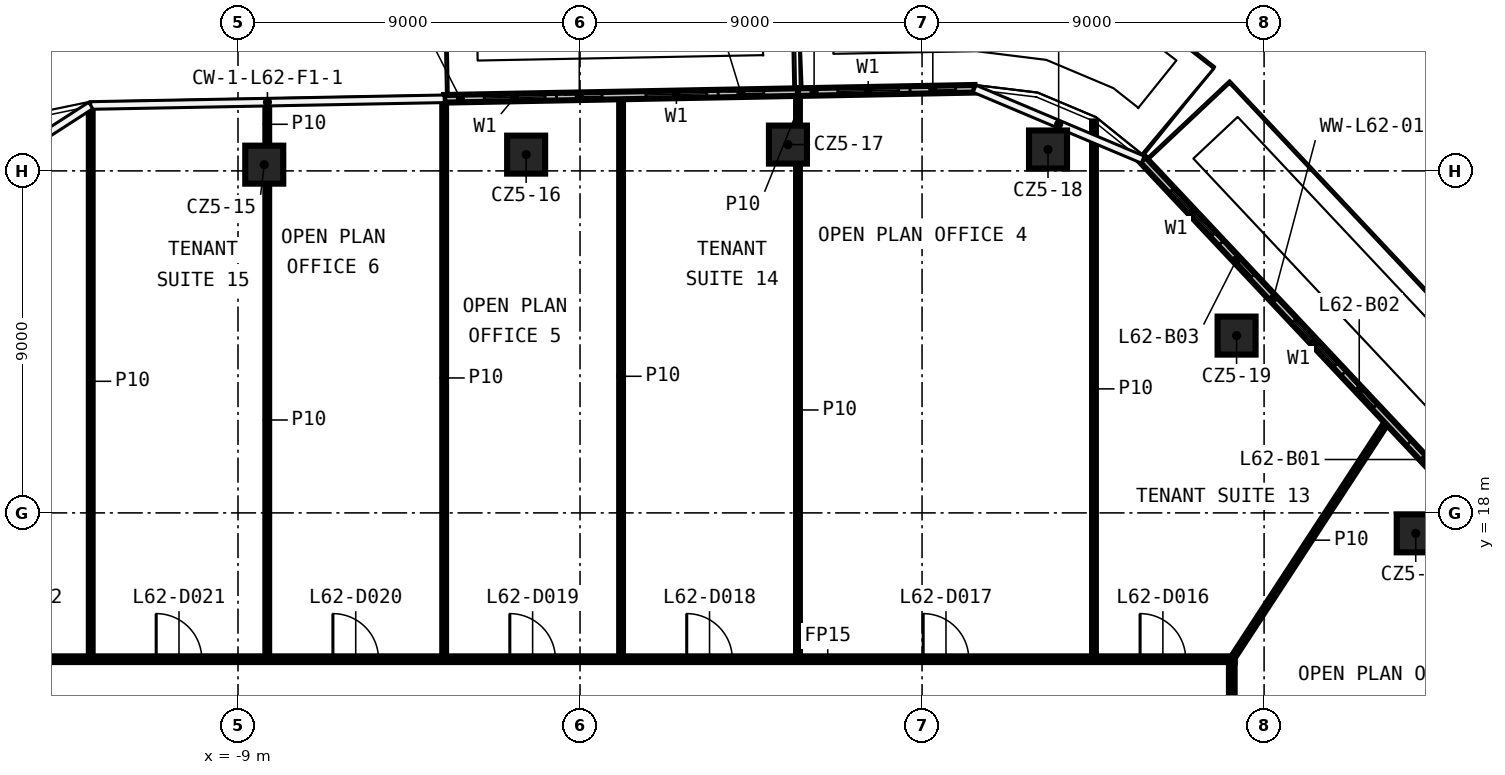
"""IFC4 building model, lengths in metres.
Left out: names, types, materials, properties, quantities, classifications, styles, units other than length and angle.
Written with IfcOpenShell. Run it as: python <this file> out.ifc"""

import sys

from ifc_helpers import new_model, si_unit, direction, frame, frame_2d, origin, origin_2d, place, context, subcontext, project, spatial, rectangle, extrude, element, fill, save


model = new_model("IFC4")
c1 = context("Model", 3, precision=1e-05, world=origin(), true_north=direction((0.0, 1.0)))
c2 = subcontext(c1, "Body", "Model", "MODEL_VIEW")
j1 = project(units=[si_unit("LENGTHUNIT", "METRE"), si_unit("PLANEANGLEUNIT", "RADIAN")], contexts=[c1])
p1 = place(None, origin())
s1 = spatial("IfcSite", under=j1, at=p1, CompositionType="ELEMENT")
p2 = place(p1, origin())
s2 = spatial("IfcBuilding", under=s1, at=p2, CompositionType="ELEMENT")
p3 = place(p2, frame((0.0, 0.0, 294.2)))
s3 = spatial("IfcBuildingStorey", under=s2, at=p3, CompositionType="ELEMENT", Elevation=294.2)
for number, where, z_axis, x_axis in (
    (1, (-8.309, 27.164, 0.0), (0.0, 0.0, 1.0), (1.0, 0.0, 0.0)),
    (2, (-1.418, 27.428, 0.0), (0.0, 0.0, 1.0), (1.0, 0.0, 0.0)),
    (3, (5.471, 27.692, 0.0), (0.0, 0.0, 1.0), (1.0, 0.0, 0.0)),
    (4, (12.314, 27.563, 0.0), (0.0, 0.0, 1.0), (1.0, 0.0, 0.0)),
    (5, (17.276, 22.666, 0.0), (0.0, 0.0, 1.0), (1.0, 0.0, 0.0)),
    (6, (21.99, 17.462, 0.0), (0.0, 0.0, 1.0), (1.0, 0.0, 0.0)),
):
    element("IfcColumn", number, at=place(p3, frame(where, z_axis=z_axis, x_axis=x_axis)), inside=s3, PredefinedType="COLUMN", context=c2, shape_type="SweptSolid", body=[
        extrude(rectangle(XDim=1.0, YDim=1.0, at=origin_2d()), origin(), (0.0, 0.0, 1.0), 3.82),
    ])
p4 = place(p3, frame((-17.225, 14.15, 0.0), z_axis=(0.0, 0.0, 1.0), x_axis=(1.0, 0.0, 0.0)))
e7 = element("IfcWall", 7, at=p4, inside=s3, PredefinedType="PARTITIONING", context=c2, shape_type="SweptSolid", body=[
    extrude(rectangle(XDim=34.45, YDim=0.15, at=frame_2d((17.225, 0.0))), origin(), (0.0, 0.0, 1.0), 3.82),
])
p5 = place(p4, frame((31.962, 0.0, 0.0)))
e8 = element("IfcOpeningElement", 8, at=p5, cuts=e7, PredefinedType="OPENING", context=c2, shape_type="SweptSolid", body=[
    extrude(rectangle(XDim=1.2, YDim=2.1, at=frame_2d((0.6, 1.05))), frame((0.0, 0.085, 0.0), z_axis=(0.0, -1.0, 0.0), x_axis=(1.0, 0.0, 0.0)), (0.0, 0.0, 1.0), 0.17),
])
p6 = place(p4, frame((26.254, 0.0, 0.0)))
e9 = element("IfcOpeningElement", 9, at=p6, cuts=e7, PredefinedType="OPENING", context=c2, shape_type="SweptSolid", body=[
    extrude(rectangle(XDim=1.2, YDim=2.1, at=frame_2d((0.6, 1.05))), frame((0.0, 0.085, 0.0), z_axis=(0.0, -1.0, 0.0), x_axis=(1.0, 0.0, 0.0)), (0.0, 0.0, 1.0), 0.17),
])
p7 = place(p4, frame((20.032, 0.0, 0.0)))
e10 = element("IfcOpeningElement", 10, at=p7, cuts=e7, PredefinedType="OPENING", context=c2, shape_type="SweptSolid", body=[
    extrude(rectangle(XDim=1.2, YDim=2.1, at=frame_2d((0.6, 1.05))), frame((0.0, 0.085, 0.0), z_axis=(0.0, -1.0, 0.0), x_axis=(1.0, 0.0, 0.0)), (0.0, 0.0, 1.0), 0.17),
])
p8 = place(p4, frame((15.378, 0.0, 0.0)))
e11 = element("IfcOpeningElement", 11, at=p8, cuts=e7, PredefinedType="OPENING", context=c2, shape_type="SweptSolid", body=[
    extrude(rectangle(XDim=1.2, YDim=2.1, at=frame_2d((0.6, 1.05))), frame((0.0, 0.085, 0.0), z_axis=(0.0, -1.0, 0.0), x_axis=(1.0, 0.0, 0.0)), (0.0, 0.0, 1.0), 0.17),
])
p9 = place(p4, frame((10.723, 0.0, 0.0)))
e12 = element("IfcOpeningElement", 12, at=p9, cuts=e7, PredefinedType="OPENING", context=c2, shape_type="SweptSolid", body=[
    extrude(rectangle(XDim=1.2, YDim=2.1, at=frame_2d((0.6, 1.05))), frame((0.0, 0.085, 0.0), z_axis=(0.0, -1.0, 0.0), x_axis=(1.0, 0.0, 0.0)), (0.0, 0.0, 1.0), 0.17),
])
p10 = place(p4, frame((6.073, 0.0, 0.0)))
e13 = element("IfcOpeningElement", 13, at=p10, cuts=e7, PredefinedType="OPENING", context=c2, shape_type="SweptSolid", body=[
    extrude(rectangle(XDim=1.2, YDim=2.1, at=frame_2d((0.6, 1.05))), frame((0.0, 0.085, 0.0), z_axis=(0.0, -1.0, 0.0), x_axis=(1.0, 0.0, 0.0)), (0.0, 0.0, 1.0), 0.17),
])
p11 = place(p4, frame((1.774, 0.0, 0.0)))
e14 = element("IfcOpeningElement", 14, at=p11, cuts=e7, PredefinedType="OPENING", context=c2, shape_type="SweptSolid", body=[
    extrude(rectangle(XDim=1.2, YDim=2.1, at=frame_2d((0.6, 1.05))), frame((0.0, 0.085, 0.0), z_axis=(0.0, -1.0, 0.0), x_axis=(1.0, 0.0, 0.0)), (0.0, 0.0, 1.0), 0.17),
])
p12 = place(p3, frame((17.15, 14.15, 0.0), z_axis=(0.0, 0.0, 1.0), x_axis=(0.547120172247, 0.837054070608, 0.0)))
e15 = element("IfcWall", 15, at=p12, inside=s3, PredefinedType="PARTITIONING", context=c2, shape_type="SweptSolid", body=[
    extrude(rectangle(XDim=7.485, YDim=0.1, at=frame_2d((3.743, 0.0))), origin(), (0.0, 0.0, 1.0), 3.82),
])
p13 = place(p3, frame((17.15, 14.075, 0.0), z_axis=(0.0, 0.0, 1.0), x_axis=(0.0, -1.0, 0.0)))
e16 = element("IfcWall", 16, at=p13, inside=s3, PredefinedType="PARTITIONING", context=c2, shape_type="SweptSolid", body=[
    extrude(rectangle(XDim=28.15, YDim=0.15, at=frame_2d((14.075, 0.0))), origin(), (0.0, 0.0, 1.0), 3.82),
])
p14 = place(p13, frame((24.326, 0.0, 0.0)))
e17 = element("IfcOpeningElement", 17, at=p14, cuts=e16, PredefinedType="OPENING", context=c2, shape_type="SweptSolid", body=[
    extrude(rectangle(XDim=1.2, YDim=2.1, at=frame_2d((0.6, 1.05))), frame((0.0, 0.085, 0.0), z_axis=(0.0, -1.0, 0.0), x_axis=(1.0, 0.0, 0.0)), (0.0, 0.0, 1.0), 0.17),
])
p15 = place(p13, frame((20.22, 0.0, 0.0)))
e18 = element("IfcOpeningElement", 18, at=p15, cuts=e16, PredefinedType="OPENING", context=c2, shape_type="SweptSolid", body=[
    extrude(rectangle(XDim=1.2, YDim=2.1, at=frame_2d((0.6, 1.05))), frame((0.0, 0.085, 0.0), z_axis=(0.0, -1.0, 0.0), x_axis=(1.0, 0.0, 0.0)), (0.0, 0.0, 1.0), 0.17),
])
p16 = place(p13, frame((16.114, 0.0, 0.0)))
e19 = element("IfcOpeningElement", 19, at=p16, cuts=e16, PredefinedType="OPENING", context=c2, shape_type="SweptSolid", body=[
    extrude(rectangle(XDim=1.2, YDim=2.1, at=frame_2d((0.6, 1.05))), frame((0.0, 0.085, 0.0), z_axis=(0.0, -1.0, 0.0), x_axis=(1.0, 0.0, 0.0)), (0.0, 0.0, 1.0), 0.17),
])
p17 = place(p13, frame((12.012, 0.0, 0.0)))
e20 = element("IfcOpeningElement", 20, at=p17, cuts=e16, PredefinedType="OPENING", context=c2, shape_type="SweptSolid", body=[
    extrude(rectangle(XDim=1.2, YDim=2.1, at=frame_2d((0.6, 1.05))), frame((0.0, 0.085, 0.0), z_axis=(0.0, -1.0, 0.0), x_axis=(1.0, 0.0, 0.0)), (0.0, 0.0, 1.0), 0.17),
])
p18 = place(p13, frame((5.504, 0.0, 0.0)))
e21 = element("IfcOpeningElement", 21, at=p18, cuts=e16, PredefinedType="OPENING", context=c2, shape_type="SweptSolid", body=[
    extrude(rectangle(XDim=1.2, YDim=2.1, at=frame_2d((0.6, 1.05))), frame((0.0, 0.085, 0.0), z_axis=(0.0, -1.0, 0.0), x_axis=(1.0, 0.0, 0.0)), (0.0, 0.0, 1.0), 0.17),
])
p19 = place(p13, frame((1.622, 0.0, 0.0)))
e22 = element("IfcOpeningElement", 22, at=p19, cuts=e16, PredefinedType="OPENING", context=c2, shape_type="SweptSolid", body=[
    extrude(rectangle(XDim=1.2, YDim=2.1, at=frame_2d((0.6, 1.05))), frame((0.0, 0.085, 0.0), z_axis=(0.0, -1.0, 0.0), x_axis=(1.0, 0.0, 0.0)), (0.0, 0.0, 1.0), 0.17),
])
p20 = place(p3, frame((13.524, 14.225, 0.0), z_axis=(0.0, 0.0, 1.0), x_axis=(0.0, 1.0, 0.0)))
e23 = element("IfcWall", 23, at=p20, inside=s3, PredefinedType="PARTITIONING", context=c2, shape_type="SweptSolid", body=[
    extrude(rectangle(XDim=14.077, YDim=0.1, at=frame_2d((7.039, 0.0))), origin(), (0.0, 0.0, 1.0), 3.82),
])
p21 = place(p3, frame((5.735, 14.225, 0.0), z_axis=(0.0, 0.0, 1.0), x_axis=(0.0, 1.0, 0.0)))
e24 = element("IfcWall", 24, at=p21, inside=s3, PredefinedType="PARTITIONING", context=c2, shape_type="SweptSolid", body=[
    extrude(rectangle(XDim=12.967, YDim=0.1, at=frame_2d((6.483, 0.0))), origin(), (0.0, 0.0, 1.0), 3.82),
])
p22 = place(p3, frame((5.735, 28.192, 0.0), z_axis=(0.0, 0.0, 1.0), x_axis=(0.0, 1.0, 0.0)))
e25 = element("IfcWall", 25, at=p22, inside=s3, PredefinedType="PARTITIONING", context=c2, shape_type="SweptSolid", body=[
    extrude(rectangle(XDim=0.861, YDim=0.1, at=frame_2d((0.43, 0.0))), origin(), (0.0, 0.0, 1.0), 3.82),
])
p23 = place(p3, frame((1.08, 14.225, 0.0), z_axis=(0.0, 0.0, 1.0), x_axis=(0.0, 1.0, 0.0)))
e26 = element("IfcWall", 26, at=p23, inside=s3, PredefinedType="PARTITIONING", context=c2, shape_type="SweptSolid", body=[
    extrude(rectangle(XDim=14.74, YDim=0.1, at=frame_2d((7.37, 0.0))), origin(), (0.0, 0.0, 1.0), 3.82),
])
p24 = place(p3, frame((-3.575, 14.225, 0.0), z_axis=(0.0, 0.0, 1.0), x_axis=(0.0, 1.0, 0.0)))
e27 = element("IfcWall", 27, at=p24, inside=s3, PredefinedType="PARTITIONING", context=c2, shape_type="SweptSolid", body=[
    extrude(rectangle(XDim=14.652, YDim=0.1, at=frame_2d((7.326, 0.0))), origin(), (0.0, 0.0, 1.0), 3.82),
])
p25 = place(p3, frame((-8.23, 14.225, 0.0), z_axis=(0.0, 0.0, 1.0), x_axis=(0.0, 1.0, 0.0)))
e28 = element("IfcWall", 28, at=p25, inside=s3, PredefinedType="PARTITIONING", context=c2, shape_type="SweptSolid", body=[
    extrude(rectangle(XDim=12.439, YDim=0.1, at=frame_2d((6.219, 0.0))), origin(), (0.0, 0.0, 1.0), 3.82),
])
p26 = place(p3, frame((-8.23, 27.664, 0.0), z_axis=(0.0, 0.0, 1.0), x_axis=(0.0, 1.0, 0.0)))
e29 = element("IfcWall", 29, at=p26, inside=s3, PredefinedType="PARTITIONING", context=c2, shape_type="SweptSolid", body=[
    extrude(rectangle(XDim=1.125, YDim=0.1, at=frame_2d((0.562, 0.0))), origin(), (0.0, 0.0, 1.0), 3.82),
])
p27 = place(p3, frame((-12.875, 14.225, 0.0), z_axis=(0.0, 0.0, 1.0), x_axis=(0.0, 1.0, 0.0)))
e30 = element("IfcWall", 30, at=p27, inside=s3, PredefinedType="PARTITIONING", context=c2, shape_type="SweptSolid", body=[
    extrude(rectangle(XDim=14.475, YDim=0.1, at=frame_2d((7.238, 0.0))), origin(), (0.0, 0.0, 1.0), 3.82),
])
p28 = place(p3, frame((24.482, 17.0, 0.0), z_axis=(0.0, 0.0, 1.0), x_axis=(-0.684823965592, 0.728708539919, 0.0)))
e31 = element("IfcWall", 31, at=p28, inside=s3, PredefinedType="SOLIDWALL", context=c2, shape_type="SweptSolid", body=[
    extrude(rectangle(XDim=14.131, YDim=0.2, at=frame_2d((7.065, 0.0))), origin(), (0.0, 0.0, 1.0), 3.82),
])
p29 = place(p28, frame((0.5, 0.0, 0.6)))
e32 = element("IfcOpeningElement", 32, at=p29, cuts=e31, PredefinedType="OPENING", context=c2, shape_type="SweptSolid", body=[
    extrude(rectangle(XDim=1.6, YDim=2.4, at=frame_2d((0.8, 1.2))), frame((0.0, 0.11, 0.0), z_axis=(0.0, -1.0, 0.0), x_axis=(1.0, 0.0, 0.0)), (0.0, 0.0, 1.0), 0.22),
])
p30 = place(p28, frame((2.7, 0.0, 0.0)))
e33 = element("IfcOpeningElement", 33, at=p30, cuts=e31, PredefinedType="OPENING", context=c2, shape_type="SweptSolid", body=[
    extrude(rectangle(XDim=1.2, YDim=2.4, at=frame_2d((0.6, 1.2))), frame((0.0, 0.11, 0.0), z_axis=(0.0, -1.0, 0.0), x_axis=(1.0, 0.0, 0.0)), (0.0, 0.0, 1.0), 0.22),
])
p31 = place(p28, frame((6.71, 0.0, 0.6)))
e34 = element("IfcOpeningElement", 34, at=p31, cuts=e31, PredefinedType="OPENING", context=c2, shape_type="SweptSolid", body=[
    extrude(rectangle(XDim=1.6, YDim=2.4, at=frame_2d((0.8, 1.2))), frame((0.0, 0.11, 0.0), z_axis=(0.0, -1.0, 0.0), x_axis=(1.0, 0.0, 0.0)), (0.0, 0.0, 1.0), 0.22),
])
p32 = place(p28, frame((5.21, 0.0, 0.0)))
e35 = element("IfcOpeningElement", 35, at=p32, cuts=e31, PredefinedType="OPENING", context=c2, shape_type="SweptSolid", body=[
    extrude(rectangle(XDim=1.2, YDim=2.4, at=frame_2d((0.6, 1.2))), frame((0.0, 0.11, 0.0), z_axis=(0.0, -1.0, 0.0), x_axis=(1.0, 0.0, 0.0)), (0.0, 0.0, 1.0), 0.22),
])
p33 = place(p28, frame((11.42, 0.0, 0.6)))
e36 = element("IfcOpeningElement", 36, at=p33, cuts=e31, PredefinedType="OPENING", context=c2, shape_type="SweptSolid", body=[
    extrude(rectangle(XDim=1.6, YDim=2.4, at=frame_2d((0.8, 1.2))), frame((0.0, 0.11, 0.0), z_axis=(0.0, -1.0, 0.0), x_axis=(1.0, 0.0, 0.0)), (0.0, 0.0, 1.0), 0.22),
])
p34 = place(p28, frame((9.92, 0.0, 0.0)))
e37 = element("IfcOpeningElement", 37, at=p34, cuts=e31, PredefinedType="OPENING", context=c2, shape_type="SweptSolid", body=[
    extrude(rectangle(XDim=1.2, YDim=2.4, at=frame_2d((0.6, 1.2))), frame((0.0, 0.11, 0.0), z_axis=(0.0, -1.0, 0.0), x_axis=(1.0, 0.0, 0.0)), (0.0, 0.0, 1.0), 0.22),
])
p35 = place(p3, frame((5.735, 29.073, 0.0), z_axis=(0.0, 0.0, 1.0), x_axis=(-0.999821300983, -0.01890412918, 0.0)))
e38 = element("IfcWall", 38, at=p35, inside=s3, PredefinedType="SOLIDWALL", context=c2, shape_type="SweptSolid", body=[
    extrude(rectangle(XDim=9.312, YDim=0.2, at=frame_2d((4.656, 0.0))), origin(), (0.0, 0.0, 1.0), 3.82),
])
p36 = place(p35, frame((2.4, 0.0, 0.6)))
e39 = element("IfcOpeningElement", 39, at=p36, cuts=e38, PredefinedType="OPENING", context=c2, shape_type="SweptSolid", body=[
    extrude(rectangle(XDim=1.6, YDim=2.4, at=frame_2d((0.8, 1.2))), frame((0.0, 0.11, 0.0), z_axis=(0.0, -1.0, 0.0), x_axis=(1.0, 0.0, 0.0)), (0.0, 0.0, 1.0), 0.22),
])
p37 = place(p35, frame((0.9, 0.0, 0.0)))
e40 = element("IfcOpeningElement", 40, at=p37, cuts=e38, PredefinedType="OPENING", context=c2, shape_type="SweptSolid", body=[
    extrude(rectangle(XDim=1.2, YDim=2.4, at=frame_2d((0.6, 1.2))), frame((0.0, 0.11, 0.0), z_axis=(0.0, -1.0, 0.0), x_axis=(1.0, 0.0, 0.0)), (0.0, 0.0, 1.0), 0.22),
])
p38 = place(p35, frame((6.656, 0.0, 0.6)))
e41 = element("IfcOpeningElement", 41, at=p38, cuts=e38, PredefinedType="OPENING", context=c2, shape_type="SweptSolid", body=[
    extrude(rectangle(XDim=1.6, YDim=2.4, at=frame_2d((0.8, 1.2))), frame((0.0, 0.11, 0.0), z_axis=(0.0, -1.0, 0.0), x_axis=(1.0, 0.0, 0.0)), (0.0, 0.0, 1.0), 0.22),
])
p39 = place(p35, frame((5.156, 0.0, 0.0)))
e42 = element("IfcOpeningElement", 42, at=p39, cuts=e38, PredefinedType="OPENING", context=c2, shape_type="SweptSolid", body=[
    extrude(rectangle(XDim=1.2, YDim=2.4, at=frame_2d((0.6, 1.2))), frame((0.0, 0.11, 0.0), z_axis=(0.0, -1.0, 0.0), x_axis=(1.0, 0.0, 0.0)), (0.0, 0.0, 1.0), 0.22),
])
p40 = place(p3, frame((10.383, 29.161, 0.0), z_axis=(0.0, 0.0, 1.0), x_axis=(-0.999821262404, -0.018906169475, 0.0)))
e43 = element("IfcWall", 43, at=p40, inside=s3, PredefinedType="SOLIDWALL", context=c2, shape_type="SweptSolid", body=[
    extrude(rectangle(XDim=4.649, YDim=0.2, at=frame_2d((2.324, 0.0))), origin(), (0.0, 0.0, 1.0), 3.82),
])
p41 = place(p40, frame((2.0, 0.0, 0.6)))
e44 = element("IfcOpeningElement", 44, at=p41, cuts=e43, PredefinedType="OPENING", context=c2, shape_type="SweptSolid", body=[
    extrude(rectangle(XDim=1.6, YDim=2.4, at=frame_2d((0.8, 1.2))), frame((0.0, 0.11, 0.0), z_axis=(0.0, -1.0, 0.0), x_axis=(1.0, 0.0, 0.0)), (0.0, 0.0, 1.0), 0.22),
])
p42 = place(p40, frame((0.5, 0.0, 0.0)))
e45 = element("IfcOpeningElement", 45, at=p42, cuts=e43, PredefinedType="OPENING", context=c2, shape_type="SweptSolid", body=[
    extrude(rectangle(XDim=1.2, YDim=2.4, at=frame_2d((0.6, 1.2))), frame((0.0, 0.11, 0.0), z_axis=(0.0, -1.0, 0.0), x_axis=(1.0, 0.0, 0.0)), (0.0, 0.0, 1.0), 0.22),
])
p43 = place(p5, origin())
e46 = element("IfcDoor", 46, at=p43, inside=s3, OperationType="SINGLE_SWING_LEFT", PredefinedType="DOOR", context=c2, shape_type="SweptSolid", body=[
    extrude(rectangle(XDim=1.2, YDim=2.1, at=frame_2d((0.6, 1.05))), frame((0.0, 0.025, 0.0), z_axis=(0.0, -1.0, 0.0), x_axis=(1.0, 0.0, 0.0)), (0.0, 0.0, 1.0), 0.05),
])
fill(e8, e46)
p44 = place(p6, origin())
e47 = element("IfcDoor", 47, at=p44, inside=s3, OperationType="SINGLE_SWING_RIGHT", PredefinedType="DOOR", context=c2, shape_type="SweptSolid", body=[
    extrude(rectangle(XDim=1.2, YDim=2.1, at=frame_2d((0.6, 1.05))), frame((0.0, 0.025, 0.0), z_axis=(0.0, -1.0, 0.0), x_axis=(1.0, 0.0, 0.0)), (0.0, 0.0, 1.0), 0.05),
])
fill(e9, e47)
p45 = place(p7, origin())
e48 = element("IfcDoor", 48, at=p45, inside=s3, OperationType="SINGLE_SWING_LEFT", PredefinedType="DOOR", context=c2, shape_type="SweptSolid", body=[
    extrude(rectangle(XDim=1.2, YDim=2.1, at=frame_2d((0.6, 1.05))), frame((0.0, 0.025, 0.0), z_axis=(0.0, -1.0, 0.0), x_axis=(1.0, 0.0, 0.0)), (0.0, 0.0, 1.0), 0.05),
])
fill(e10, e48)
p46 = place(p8, origin())
e49 = element("IfcDoor", 49, at=p46, inside=s3, OperationType="SINGLE_SWING_RIGHT", PredefinedType="DOOR", context=c2, shape_type="SweptSolid", body=[
    extrude(rectangle(XDim=1.2, YDim=2.1, at=frame_2d((0.6, 1.05))), frame((0.0, 0.025, 0.0), z_axis=(0.0, -1.0, 0.0), x_axis=(1.0, 0.0, 0.0)), (0.0, 0.0, 1.0), 0.05),
])
fill(e11, e49)
p47 = place(p9, origin())
e50 = element("IfcDoor", 50, at=p47, inside=s3, OperationType="SINGLE_SWING_LEFT", PredefinedType="DOOR", context=c2, shape_type="SweptSolid", body=[
    extrude(rectangle(XDim=1.2, YDim=2.1, at=frame_2d((0.6, 1.05))), frame((0.0, 0.025, 0.0), z_axis=(0.0, -1.0, 0.0), x_axis=(1.0, 0.0, 0.0)), (0.0, 0.0, 1.0), 0.05),
])
fill(e12, e50)
p48 = place(p10, origin())
e51 = element("IfcDoor", 51, at=p48, inside=s3, OperationType="SINGLE_SWING_RIGHT", PredefinedType="DOOR", context=c2, shape_type="SweptSolid", body=[
    extrude(rectangle(XDim=1.2, YDim=2.1, at=frame_2d((0.6, 1.05))), frame((0.0, 0.025, 0.0), z_axis=(0.0, -1.0, 0.0), x_axis=(1.0, 0.0, 0.0)), (0.0, 0.0, 1.0), 0.05),
])
fill(e13, e51)
p49 = place(p30, origin())
e52 = element("IfcDoor", 52, at=p49, inside=s3, OperationType="SLIDING_TO_LEFT", PredefinedType="DOOR", context=c2, shape_type="SweptSolid", body=[
    extrude(rectangle(XDim=1.2, YDim=2.4, at=frame_2d((0.6, 1.2))), frame((0.0, 0.025, 0.0), z_axis=(0.0, -1.0, 0.0), x_axis=(1.0, 0.0, 0.0)), (0.0, 0.0, 1.0), 0.05),
])
fill(e33, e52)
p50 = place(p31, origin())
e53 = element("IfcWindow", 53, at=p50, inside=s3, PartitioningType="SINGLE_PANEL", PredefinedType="WINDOW", context=c2, shape_type="SweptSolid", body=[
    extrude(rectangle(XDim=1.6, YDim=2.4, at=frame_2d((0.8, 1.2))), frame((0.0, 0.03, 0.0), z_axis=(0.0, -1.0, 0.0), x_axis=(1.0, 0.0, 0.0)), (0.0, 0.0, 1.0), 0.06),
])
fill(e34, e53)
p51 = place(p32, origin())
e54 = element("IfcDoor", 54, at=p51, inside=s3, OperationType="SLIDING_TO_LEFT", PredefinedType="DOOR", context=c2, shape_type="SweptSolid", body=[
    extrude(rectangle(XDim=1.2, YDim=2.4, at=frame_2d((0.6, 1.2))), frame((0.0, 0.025, 0.0), z_axis=(0.0, -1.0, 0.0), x_axis=(1.0, 0.0, 0.0)), (0.0, 0.0, 1.0), 0.05),
])
fill(e35, e54)
p52 = place(p33, origin())
e55 = element("IfcWindow", 55, at=p52, inside=s3, PartitioningType="SINGLE_PANEL", PredefinedType="WINDOW", context=c2, shape_type="SweptSolid", body=[
    extrude(rectangle(XDim=1.6, YDim=2.4, at=frame_2d((0.8, 1.2))), frame((0.0, 0.03, 0.0), z_axis=(0.0, -1.0, 0.0), x_axis=(1.0, 0.0, 0.0)), (0.0, 0.0, 1.0), 0.06),
])
fill(e36, e55)
p53 = place(p34, origin())
e56 = element("IfcDoor", 56, at=p53, inside=s3, OperationType="SLIDING_TO_LEFT", PredefinedType="DOOR", context=c2, shape_type="SweptSolid", body=[
    extrude(rectangle(XDim=1.2, YDim=2.4, at=frame_2d((0.6, 1.2))), frame((0.0, 0.025, 0.0), z_axis=(0.0, -1.0, 0.0), x_axis=(1.0, 0.0, 0.0)), (0.0, 0.0, 1.0), 0.05),
])
fill(e37, e56)
p54 = place(p36, origin())
e57 = element("IfcWindow", 57, at=p54, inside=s3, PartitioningType="SINGLE_PANEL", PredefinedType="WINDOW", context=c2, shape_type="SweptSolid", body=[
    extrude(rectangle(XDim=1.6, YDim=2.4, at=frame_2d((0.8, 1.2))), frame((0.0, 0.03, 0.0), z_axis=(0.0, -1.0, 0.0), x_axis=(1.0, 0.0, 0.0)), (0.0, 0.0, 1.0), 0.06),
])
fill(e39, e57)
p55 = place(p37, origin())
e58 = element("IfcDoor", 58, at=p55, inside=s3, OperationType="SLIDING_TO_LEFT", PredefinedType="DOOR", context=c2, shape_type="SweptSolid", body=[
    extrude(rectangle(XDim=1.2, YDim=2.4, at=frame_2d((0.6, 1.2))), frame((0.0, 0.025, 0.0), z_axis=(0.0, -1.0, 0.0), x_axis=(1.0, 0.0, 0.0)), (0.0, 0.0, 1.0), 0.05),
])
fill(e40, e58)
p56 = place(p38, origin())
e59 = element("IfcWindow", 59, at=p56, inside=s3, PartitioningType="SINGLE_PANEL", PredefinedType="WINDOW", context=c2, shape_type="SweptSolid", body=[
    extrude(rectangle(XDim=1.6, YDim=2.4, at=frame_2d((0.8, 1.2))), frame((0.0, 0.03, 0.0), z_axis=(0.0, -1.0, 0.0), x_axis=(1.0, 0.0, 0.0)), (0.0, 0.0, 1.0), 0.06),
])
fill(e41, e59)
p57 = place(p39, origin())
e60 = element("IfcDoor", 60, at=p57, inside=s3, OperationType="SLIDING_TO_LEFT", PredefinedType="DOOR", context=c2, shape_type="SweptSolid", body=[
    extrude(rectangle(XDim=1.2, YDim=2.4, at=frame_2d((0.6, 1.2))), frame((0.0, 0.025, 0.0), z_axis=(0.0, -1.0, 0.0), x_axis=(1.0, 0.0, 0.0)), (0.0, 0.0, 1.0), 0.05),
])
fill(e42, e60)
p58 = place(p41, origin())
e61 = element("IfcWindow", 61, at=p58, inside=s3, PartitioningType="SINGLE_PANEL", PredefinedType="WINDOW", context=c2, shape_type="SweptSolid", body=[
    extrude(rectangle(XDim=1.6, YDim=2.4, at=frame_2d((0.8, 1.2))), frame((0.0, 0.03, 0.0), z_axis=(0.0, -1.0, 0.0), x_axis=(1.0, 0.0, 0.0)), (0.0, 0.0, 1.0), 0.06),
])
fill(e44, e61)
p59 = place(p42, origin())
e62 = element("IfcDoor", 62, at=p59, inside=s3, OperationType="SLIDING_TO_LEFT", PredefinedType="DOOR", context=c2, shape_type="SweptSolid", body=[
    extrude(rectangle(XDim=1.2, YDim=2.4, at=frame_2d((0.6, 1.2))), frame((0.0, 0.025, 0.0), z_axis=(0.0, -1.0, 0.0), x_axis=(1.0, 0.0, 0.0)), (0.0, 0.0, 1.0), 0.05),
])
fill(e45, e62)
save(model, sys.argv[1])
